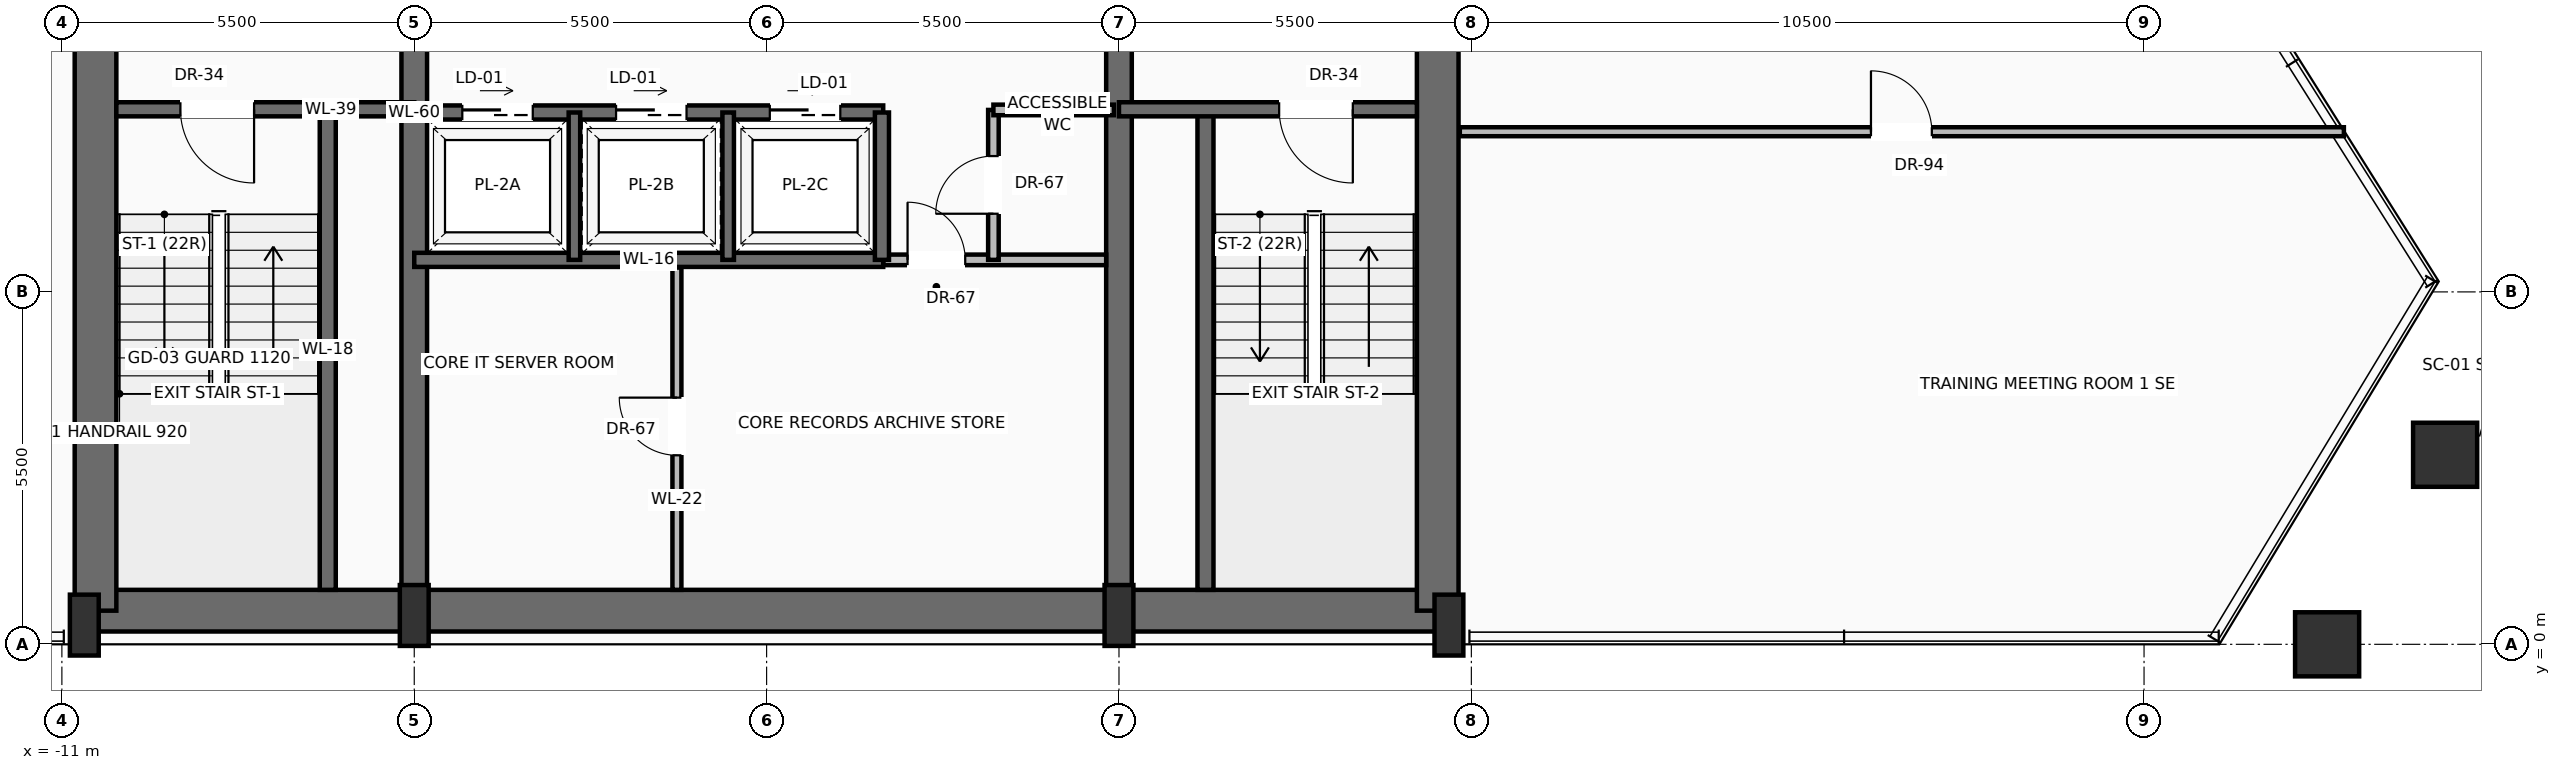
"""IFC4 building model, lengths in metres.
Left out: names, types, materials, properties, quantities, classifications, styles, units other than length and angle.
Written with IfcOpenShell. Run it as: python <this file> out.ifc"""

import sys

from ifc_helpers import new_model, si_unit, direction, frame, frame_2d, origin, origin_2d, place, context, subcontext, project, spatial, rectangle, hollow_rectangle, extrude, source, transform, mapped, element, fill, save


model = new_model("IFC4")
c1 = context("Model", 3, precision=1e-05, world=origin(), true_north=direction((0.0, 1.0)))
c2 = subcontext(c1, "Body", "Model", "MODEL_VIEW")
j1 = project(units=[si_unit("LENGTHUNIT", "METRE"), si_unit("PLANEANGLEUNIT", "RADIAN")], contexts=[c1])
p1 = place(None, origin())
s1 = spatial("IfcSite", under=j1, at=p1, CompositionType="ELEMENT")
p2 = place(p1, origin())
s2 = spatial("IfcBuilding", under=s1, at=p2, CompositionType="ELEMENT")
p3 = place(p2, frame((0.0, 0.0, 211.7)))
s3 = spatial("IfcBuildingStorey", under=s2, at=p3, CompositionType="ELEMENT", Elevation=211.7)
p4 = place(p3, frame((-10.65, 0.525, 0.0), z_axis=(0.0, 0.0, 1.0), x_axis=(1.0, 0.0, 0.0)))
e1 = element("IfcWall", 1, at=p4, inside=s3, PredefinedType="SHEAR", context=c2, shape_type="SweptSolid", body=[
    extrude(rectangle(XDim=21.3, YDim=0.65, at=frame_2d((10.65, 0.0))), origin(), (0.0, 0.0, 1.0), 3.42),
])
for number, where, z_axis, x_axis in (
    (2, (-10.475, 0.525, 0.0), (0.0, 0.0, 1.0), (0.0, 1.0, 0.0)),
    (3, (10.475, 0.525, 0.0), (0.0, 0.0, 1.0), (0.0, 1.0, 0.0)),
):
    element("IfcWall", number, at=place(p3, frame(where, z_axis=z_axis, x_axis=x_axis)), inside=s3, PredefinedType="SHEAR", context=c2, shape_type="SweptSolid", body=[
        extrude(rectangle(XDim=15.55, YDim=0.65, at=frame_2d((7.775, 0.0))), origin(), (0.0, 0.0, 1.0), 3.42),
    ])
p5 = place(p3, frame((-5.5, 0.525, 0.0), z_axis=(0.0, 0.0, 1.0), x_axis=(0.0, 1.0, 0.0)))
e4 = element("IfcWall", 4, at=p5, inside=s3, PredefinedType="SHEAR", context=c2, shape_type="SweptSolid", body=[
    extrude(rectangle(XDim=15.55, YDim=0.4, at=frame_2d((7.775, 0.0))), origin(), (0.0, 0.0, 1.0), 3.42),
])
p6 = place(p5, frame((8.975, 0.0, 0.0)))
e5 = element("IfcOpeningElement", 5, at=p6, cuts=e4, PredefinedType="OPENING", context=c2, shape_type="SweptSolid", body=[
    extrude(rectangle(XDim=1.1, YDim=2.2, at=frame_2d((0.55, 1.1))), frame((0.0, 0.21, 0.0), z_axis=(0.0, -1.0, 0.0), x_axis=(1.0, 0.0, 0.0)), (0.0, 0.0, 1.0), 0.42),
])
p7 = place(p3, frame((5.5, 0.525, 0.0), z_axis=(0.0, 0.0, 1.0), x_axis=(0.0, 1.0, 0.0)))
e6 = element("IfcWall", 6, at=p7, inside=s3, PredefinedType="SHEAR", context=c2, shape_type="SweptSolid", body=[
    extrude(rectangle(XDim=15.55, YDim=0.4, at=frame_2d((7.775, 0.0))), origin(), (0.0, 0.0, 1.0), 3.42),
])
p8 = place(p7, frame((8.975, 0.0, 0.0)))
e7 = element("IfcOpeningElement", 7, at=p8, cuts=e6, PredefinedType="OPENING", context=c2, shape_type="SweptSolid", body=[
    extrude(rectangle(XDim=1.1, YDim=2.2, at=frame_2d((0.55, 1.1))), frame((0.0, 0.21, 0.0), z_axis=(0.0, -1.0, 0.0), x_axis=(1.0, 0.0, 0.0)), (0.0, 0.0, 1.0), 0.42),
])
m1 = source(origin(), c2, "Body", "SweptSolid", [
    extrude(rectangle(XDim=0.45, YDim=0.95, at=origin_2d()), origin(), (0.0, 0.0, 1.0), 3.7),
])
for number, where, z_axis, x_axis in (
    (8, (-10.65, 0.3, 0.0), (0.0, 0.0, 1.0), (1.0, 0.0, 0.0)),
    (9, (-5.5, 0.45, 0.0), (0.0, 0.0, 1.0), (1.0, 0.0, 0.0)),
    (10, (5.5, 0.45, 0.0), (0.0, 0.0, 1.0), (1.0, 0.0, 0.0)),
    (11, (10.65, 0.3, 0.0), (0.0, 0.0, 1.0), (1.0, 0.0, 0.0)),
):
    element("IfcColumn", number, at=place(p3, frame(where, z_axis=z_axis, x_axis=x_axis)), inside=s3, PredefinedType="PILASTER", context=c2, shape_type="MappedRepresentation", body=[
        mapped(m1, transform((0.0, 0.0, 0.0), scale=1.0)),
    ])
m2 = source(origin(), c2, "Body", "SweptSolid", [
    extrude(hollow_rectangle(XDim=1.0, YDim=1.0, WallThickness=0.05, at=origin_2d()), origin(), (0.0, 0.0, 1.0), 3.691),
])
p9 = place(p3, frame((24.357, 0.0, 0.004), z_axis=(0.004034625538, 0.0, 0.999991860865), x_axis=(0.0, 1.0, 0.0)))
e12 = element("IfcColumn", 12, at=p9, inside=s3, PredefinedType="COLUMN", context=c2, shape_type="MappedRepresentation", body=[
    mapped(m2, transform((0.0, 0.0, 0.0), scale=1.0)),
])
m3 = source(origin(), c2, "Body", "SweptSolid", [
    extrude(hollow_rectangle(XDim=1.0, YDim=1.0, WallThickness=0.05, at=origin_2d()), origin(), (0.0, 0.0, 1.0), 3.692),
])
p10 = place(p3, frame((26.199, 2.958, 0.004), z_axis=(-0.008266275196, -0.016929331601, 0.999822517463), x_axis=(0.898599702764, -0.438769386115, 0.0)))
e13 = element("IfcColumn", 13, at=p10, inside=s3, PredefinedType="COLUMN", context=c2, shape_type="MappedRepresentation", body=[
    mapped(m3, transform((0.0, 0.0, 0.0), scale=1.0)),
])
p11 = place(p3, frame((-6.85, 0.85, 0.0), z_axis=(0.0, 0.0, 1.0), x_axis=(0.0, 1.0, 0.0)))
e14 = element("IfcWall", 14, at=p11, inside=s3, PredefinedType="SOLIDWALL", context=c2, shape_type="SweptSolid", body=[
    extrude(rectangle(XDim=7.5, YDim=0.25, at=frame_2d((3.75, 0.0))), origin(), (0.0, 0.0, 1.0), 3.42),
])
p12 = place(p3, frame((-5.5, 8.35, 0.0), z_axis=(0.0, 0.0, 1.0), x_axis=(-1.0, 0.0, 0.0)))
e15 = element("IfcWall", 15, at=p12, inside=s3, PredefinedType="SOLIDWALL", context=c2, shape_type="SweptSolid", body=[
    extrude(rectangle(XDim=4.65, YDim=0.22, at=frame_2d((2.325, 0.0))), origin(), (0.0, 0.0, 1.0), 3.42),
])
p13 = place(p12, frame((2.5, 0.0, 0.0)))
e16 = element("IfcOpeningElement", 16, at=p13, cuts=e15, PredefinedType="OPENING", context=c2, shape_type="SweptSolid", body=[
    extrude(rectangle(XDim=1.15, YDim=2.2, at=frame_2d((0.575, 1.1))), frame((0.0, 0.12, 0.0), z_axis=(0.0, -1.0, 0.0), x_axis=(1.0, 0.0, 0.0)), (0.0, 0.0, 1.0), 0.24),
])
p14 = place(p3, frame((6.85, 0.85, 0.0), z_axis=(0.0, 0.0, 1.0), x_axis=(0.0, 1.0, 0.0)))
e17 = element("IfcWall", 17, at=p14, inside=s3, PredefinedType="SOLIDWALL", context=c2, shape_type="SweptSolid", body=[
    extrude(rectangle(XDim=7.5, YDim=0.25, at=frame_2d((3.75, 0.0))), origin(), (0.0, 0.0, 1.0), 3.42),
])
p15 = place(p3, frame((10.15, 8.35, 0.0), z_axis=(0.0, 0.0, 1.0), x_axis=(-1.0, 0.0, 0.0)))
e18 = element("IfcWall", 18, at=p15, inside=s3, PredefinedType="SOLIDWALL", context=c2, shape_type="SweptSolid", body=[
    extrude(rectangle(XDim=4.65, YDim=0.22, at=frame_2d((2.325, 0.0))), origin(), (0.0, 0.0, 1.0), 3.42),
])
p16 = place(p15, frame((1.0, 0.0, 0.0)))
e19 = element("IfcOpeningElement", 19, at=p16, cuts=e18, PredefinedType="OPENING", context=c2, shape_type="SweptSolid", body=[
    extrude(rectangle(XDim=1.15, YDim=2.2, at=frame_2d((0.575, 1.1))), frame((0.0, 0.12, 0.0), z_axis=(0.0, -1.0, 0.0), x_axis=(1.0, 0.0, 0.0)), (0.0, 0.0, 1.0), 0.24),
])
p17 = place(p3, frame((1.82, 6.0, 0.0), z_axis=(0.0, 0.0, 1.0), x_axis=(1.0, 0.0, 0.0)))
e20 = element("IfcWall", 20, at=p17, inside=s3, PredefinedType="PARTITIONING", context=c2, shape_type="SweptSolid", body=[
    extrude(rectangle(XDim=3.48, YDim=0.165, at=frame_2d((1.74, 0.0))), origin(), (0.0, 0.0, 1.0), 3.412),
])
p18 = place(p17, frame((0.38, 0.0, 0.0)))
e21 = element("IfcOpeningElement", 21, at=p18, cuts=e20, PredefinedType="OPENING", context=c2, shape_type="SweptSolid", body=[
    extrude(rectangle(XDim=0.9, YDim=2.1, at=frame_2d((0.45, 1.05))), frame((0.0, 0.093, 0.0), z_axis=(0.0, -1.0, 0.0), x_axis=(1.0, 0.0, 0.0)), (0.0, 0.0, 1.0), 0.185),
])
p19 = place(p3, frame((-1.4, 0.85, 0.0), z_axis=(0.0, 0.0, 1.0), x_axis=(0.0, 1.0, 0.0)))
e22 = element("IfcWall", 22, at=p19, inside=s3, PredefinedType="PARTITIONING", context=c2, shape_type="SweptSolid", body=[
    extrude(rectangle(XDim=5.03, YDim=0.14, at=frame_2d((2.515, 0.0))), origin(), (0.0, 0.0, 1.0), 3.412),
])
p20 = place(p19, frame((2.1, 0.0, 0.0)))
e23 = element("IfcOpeningElement", 23, at=p20, cuts=e22, PredefinedType="OPENING", context=c2, shape_type="SweptSolid", body=[
    extrude(rectangle(XDim=0.9, YDim=2.1, at=frame_2d((0.45, 1.05))), frame((0.0, 0.08, 0.0), z_axis=(0.0, -1.0, 0.0), x_axis=(1.0, 0.0, 0.0)), (0.0, 0.0, 1.0), 0.16),
])
p21 = place(p3, frame((3.54, 6.0, 0.0), z_axis=(0.0, 0.0, 1.0), x_axis=(0.0, 1.0, 0.0)))
e24 = element("IfcWall", 24, at=p21, inside=s3, PredefinedType="PARTITIONING", context=c2, shape_type="SweptSolid", body=[
    extrude(rectangle(XDim=2.34, YDim=0.165, at=frame_2d((1.17, 0.0))), origin(), (0.0, 0.0, 1.0), 3.412),
])
p22 = place(p21, frame((0.72, 0.0, 0.0)))
e25 = element("IfcOpeningElement", 25, at=p22, cuts=e24, PredefinedType="OPENING", context=c2, shape_type="SweptSolid", body=[
    extrude(rectangle(XDim=0.9, YDim=2.1, at=frame_2d((0.45, 1.05))), frame((0.0, 0.093, 0.0), z_axis=(0.0, -1.0, 0.0), x_axis=(1.0, 0.0, 0.0)), (0.0, 0.0, 1.0), 0.185),
])
p23 = place(p3, frame((3.54, 8.34, 0.0), z_axis=(0.0, 0.0, 1.0), x_axis=(1.0, 0.0, 0.0)))
e26 = element("IfcWall", 26, at=p23, inside=s3, PredefinedType="PARTITIONING", context=c2, shape_type="SweptSolid", body=[
    extrude(rectangle(XDim=1.88, YDim=0.165, at=frame_2d((0.94, 0.0))), origin(), (0.0, 0.0, 1.0), 3.412),
])
p24 = place(p3, frame((-5.5, 6.0, 0.0), z_axis=(0.0, 0.0, 1.0), x_axis=(1.0, 0.0, 0.0)))
e27 = element("IfcWall", 27, at=p24, inside=s3, PredefinedType="SOLIDWALL", context=c2, shape_type="SweptSolid", body=[
    extrude(rectangle(XDim=7.32, YDim=0.22, at=frame_2d((3.66, 0.0))), origin(), (0.0, 0.0, 1.0), 3.42),
])
p25 = place(p3, frame((-5.5, 8.3, 0.0), z_axis=(0.0, 0.0, 1.0), x_axis=(1.0, 0.0, 0.0)))
e28 = element("IfcWall", 28, at=p25, inside=s3, PredefinedType="SOLIDWALL", context=c2, shape_type="SweptSolid", body=[
    extrude(rectangle(XDim=7.32, YDim=0.22, at=frame_2d((3.66, 0.0))), origin(), (0.0, 0.0, 1.0), 3.42),
])
p26 = place(p25, frame((0.75, 0.0, 0.0)))
e29 = element("IfcOpeningElement", 29, at=p26, cuts=e28, PredefinedType="OPENING", context=c2, shape_type="SweptSolid", body=[
    extrude(rectangle(XDim=1.1, YDim=2.2, at=frame_2d((0.55, 1.1))), frame((0.0, 0.12, 0.0), z_axis=(0.0, -1.0, 0.0), x_axis=(1.0, 0.0, 0.0)), (0.0, 0.0, 1.0), 0.24),
])
p27 = place(p25, frame((3.15, 0.0, 0.0)))
e30 = element("IfcOpeningElement", 30, at=p27, cuts=e28, PredefinedType="OPENING", context=c2, shape_type="SweptSolid", body=[
    extrude(rectangle(XDim=1.1, YDim=2.2, at=frame_2d((0.55, 1.1))), frame((0.0, 0.12, 0.0), z_axis=(0.0, -1.0, 0.0), x_axis=(1.0, 0.0, 0.0)), (0.0, 0.0, 1.0), 0.24),
])
p28 = place(p25, frame((5.55, 0.0, 0.0)))
e31 = element("IfcOpeningElement", 31, at=p28, cuts=e28, PredefinedType="OPENING", context=c2, shape_type="SweptSolid", body=[
    extrude(rectangle(XDim=1.1, YDim=2.2, at=frame_2d((0.55, 1.1))), frame((0.0, 0.12, 0.0), z_axis=(0.0, -1.0, 0.0), x_axis=(1.0, 0.0, 0.0)), (0.0, 0.0, 1.0), 0.24),
])
p29 = place(p3, frame((1.8, 6.0, 0.0), z_axis=(0.0, 0.0, 1.0), x_axis=(0.0, 1.0, 0.0)))
e32 = element("IfcWall", 32, at=p29, inside=s3, PredefinedType="SOLIDWALL", context=c2, shape_type="SweptSolid", body=[
    extrude(rectangle(XDim=2.3, YDim=0.22, at=frame_2d((1.15, 0.0))), origin(), (0.0, 0.0, 1.0), 3.42),
])
for number, where, z_axis, x_axis in (
    (33, (-3.0, 6.0, 0.0), (0.0, 0.0, 1.0), (0.0, 1.0, 0.0)),
    (34, (-0.6, 6.0, 0.0), (0.0, 0.0, 1.0), (0.0, 1.0, 0.0)),
):
    element("IfcWall", number, at=place(p3, frame(where, z_axis=z_axis, x_axis=x_axis)), inside=s3, PredefinedType="SOLIDWALL", context=c2, shape_type="SweptSolid", body=[
        extrude(rectangle(XDim=2.3, YDim=0.18, at=frame_2d((1.15, 0.0))), origin(), (0.0, 0.0, 1.0), 3.42),
    ])
p30 = place(p3, frame((10.82, 8.0, 0.0), z_axis=(0.0, 0.0, 1.0), x_axis=(1.0, 0.0, 0.0)))
e35 = element("IfcWall", 35, at=p30, inside=s3, PredefinedType="PARTITIONING", context=c2, shape_type="SweptSolid", body=[
    extrude(rectangle(XDim=13.799, YDim=0.14, at=frame_2d((6.899, 0.0))), origin(), (0.0, 0.0, 1.0), 3.412),
])
p31 = place(p30, frame((6.417, 0.0, 0.0)))
e36 = element("IfcOpeningElement", 36, at=p31, cuts=e35, PredefinedType="OPENING", context=c2, shape_type="SweptSolid", body=[
    extrude(rectangle(XDim=0.95, YDim=2.2, at=frame_2d((0.475, 1.1))), frame((0.0, 0.08, 0.0), z_axis=(0.0, -1.0, 0.0), x_axis=(1.0, 0.0, 0.0)), (0.0, 0.0, 1.0), 0.16),
])
m4 = source(origin(), c2, "Body", "SweptSolid", [
    extrude(rectangle(XDim=1.15, YDim=2.2, at=frame_2d((0.575, 1.1))), frame((0.0, 0.025, 0.0), z_axis=(0.0, -1.0, 0.0), x_axis=(1.0, 0.0, 0.0)), (0.0, 0.0, 1.0), 0.05),
])
p32 = place(p13, origin())
e37 = element("IfcDoor", 37, at=p32, inside=s3, OperationType="SINGLE_SWING_LEFT", PredefinedType="DOOR", context=c2, shape_type="MappedRepresentation", body=[
    mapped(m4, transform((0.0, 0.0, 0.0), scale=1.0)),
])
fill(e16, e37)
p33 = place(p16, origin())
e38 = element("IfcDoor", 38, at=p33, inside=s3, OperationType="SINGLE_SWING_LEFT", PredefinedType="DOOR", context=c2, shape_type="MappedRepresentation", body=[
    mapped(m4, transform((0.0, 0.0, 0.0), scale=1.0)),
])
fill(e19, e38)
m5 = source(origin(), c2, "Body", "SweptSolid", [
    extrude(rectangle(XDim=0.9, YDim=2.1, at=frame_2d((0.45, 1.05))), frame((0.0, 0.025, 0.0), z_axis=(0.0, -1.0, 0.0), x_axis=(1.0, 0.0, 0.0)), (0.0, 0.0, 1.0), 0.05),
])
p34 = place(p18, origin())
e39 = element("IfcDoor", 39, at=p34, inside=s3, OperationType="SINGLE_SWING_LEFT", PredefinedType="DOOR", context=c2, shape_type="MappedRepresentation", body=[
    mapped(m5, transform((0.0, 0.0, 0.0), scale=1.0)),
])
fill(e21, e39)
p35 = place(p20, origin())
e40 = element("IfcDoor", 40, at=p35, inside=s3, OperationType="SINGLE_SWING_RIGHT", PredefinedType="DOOR", context=c2, shape_type="MappedRepresentation", body=[
    mapped(m5, transform((0.0, 0.0, 0.0), scale=1.0)),
])
fill(e23, e40)
p36 = place(p22, origin())
e41 = element("IfcDoor", 41, at=p36, inside=s3, OperationType="SINGLE_SWING_LEFT", PredefinedType="DOOR", context=c2, shape_type="MappedRepresentation", body=[
    mapped(m5, transform((0.0, 0.0, 0.0), scale=1.0)),
])
fill(e25, e41)
m6 = source(origin(), c2, "Body", "SweptSolid", [
    extrude(rectangle(XDim=1.1, YDim=2.2, at=frame_2d((0.55, 1.1))), frame((0.0, 0.025, 0.0), z_axis=(0.0, -1.0, 0.0), x_axis=(1.0, 0.0, 0.0)), (0.0, 0.0, 1.0), 0.05),
])
p37 = place(p26, origin())
e42 = element("IfcDoor", 42, at=p37, inside=s3, OperationType="SLIDING_TO_LEFT", PredefinedType="DOOR", context=c2, shape_type="MappedRepresentation", body=[
    mapped(m6, transform((0.0, 0.0, 0.0), scale=1.0)),
])
fill(e29, e42)
p38 = place(p27, origin())
e43 = element("IfcDoor", 43, at=p38, inside=s3, OperationType="SLIDING_TO_LEFT", PredefinedType="DOOR", context=c2, shape_type="MappedRepresentation", body=[
    mapped(m6, transform((0.0, 0.0, 0.0), scale=1.0)),
])
fill(e30, e43)
p39 = place(p28, origin())
e44 = element("IfcDoor", 44, at=p39, inside=s3, OperationType="SLIDING_TO_LEFT", PredefinedType="DOOR", context=c2, shape_type="MappedRepresentation", body=[
    mapped(m6, transform((0.0, 0.0, 0.0), scale=1.0)),
])
fill(e31, e44)
m7 = source(origin(), c2, "Body", "SweptSolid", [
    extrude(rectangle(XDim=0.95, YDim=2.2, at=frame_2d((0.475, 1.1))), frame((0.0, 0.025, 0.0), z_axis=(0.0, -1.0, 0.0), x_axis=(1.0, 0.0, 0.0)), (0.0, 0.0, 1.0), 0.05),
])
p40 = place(p31, origin())
e45 = element("IfcDoor", 45, at=p40, inside=s3, OperationType="SINGLE_SWING_LEFT", PredefinedType="DOOR", context=c2, shape_type="MappedRepresentation", body=[
    mapped(m7, transform((0.0, 0.0, 0.0), scale=1.0)),
])
fill(e36, e45)
save(model, sys.argv[1])
